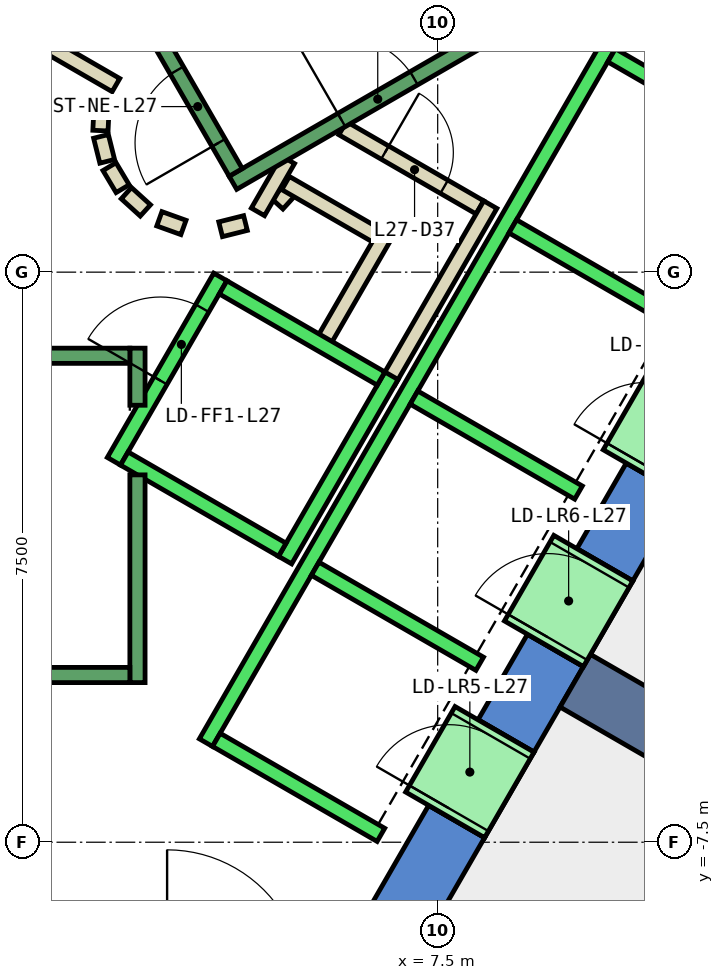
"""IFC4 building model, lengths in metres.
Left out: names, types, materials, properties, quantities, classifications, styles, units other than length and angle.
Written with IfcOpenShell. Run it as: python <this file> out.ifc"""

import sys

from ifc_helpers import new_model, si_unit, direction, frame, frame_2d, origin, place, context, subcontext, project, spatial, polyline, rectangle, outline, extrude, element, fill, save


model = new_model("IFC4")
c1 = context("Model", 3, precision=1e-05, world=origin(), true_north=direction((0.0, 1.0)))
c2 = subcontext(c1, "Body", "Model", "MODEL_VIEW")
j1 = project(units=[si_unit("LENGTHUNIT", "METRE"), si_unit("PLANEANGLEUNIT", "RADIAN")], contexts=[c1])
p1 = place(None, origin())
s1 = spatial("IfcSite", under=j1, at=p1, CompositionType="ELEMENT")
p2 = place(p1, origin())
s2 = spatial("IfcBuilding", under=s1, at=p2, CompositionType="ELEMENT")
p3 = place(p2, frame((0.0, 0.0, 124.4)))
s3 = spatial("IfcBuildingStorey", under=s2, at=p3, CompositionType="ELEMENT", Elevation=124.4)
p4 = place(p3, frame((0.0, 0.0, -0.4)))
e1 = element("IfcWall", 1, at=p4, inside=s3, PredefinedType="SHEAR", context=c2, shape_type="SweptSolid", body=[
    extrude(outline(polyline([(8.517, 11.748), (7.781, 11.323), (12.875, 2.5), (13.856, 2.5), (8.517, 11.748)])), origin(), (0.0, 0.0, 1.0), 4.2),
])
p5 = place(p3, frame((0.0, 0.0, -0.4)))
e2 = element("IfcWall", 2, at=p5, inside=s3, PredefinedType="SHEAR", context=c2, shape_type="SweptSolid", body=[
    extrude(outline(polyline([(8.117, -7.44), (7.381, -7.015), (6.437, -8.65), (6.928, -9.5), (8.117, -7.44)])), origin(), (0.0, 0.0, 1.0), 4.2),
])
p6 = place(p3, frame((0.0, 0.0, -0.4)))
e3 = element("IfcWall", 3, at=p6, inside=s3, PredefinedType="SHEAR", context=c2, shape_type="SweptSolid", body=[
    extrude(outline(polyline([(9.417, -5.189), (8.681, -4.764), (8.031, -5.889), (8.767, -6.314), (9.417, -5.189)])), origin(), (0.0, 0.0, 1.0), 4.2),
])
p7 = place(p3, frame((0.0, 0.0, -0.4)))
e4 = element("IfcWall", 4, at=p7, inside=s3, PredefinedType="SHEAR", context=c2, shape_type="SweptSolid", body=[
    extrude(outline(polyline([(10.717, -2.937), (9.981, -2.512), (9.331, -3.638), (10.067, -4.063), (10.717, -2.937)])), origin(), (0.0, 0.0, 1.0), 4.2),
])
p8 = place(p3, frame((0.0, 0.0, 3.6)))
e5 = element("IfcWall", 5, at=p8, inside=s3, PredefinedType="SHEAR", context=c2, shape_type="SweptSolid", body=[
    extrude(outline(polyline([(8.767, -6.314), (8.031, -5.889), (7.381, -7.015), (8.117, -7.44), (8.767, -6.314)])), origin(), (0.0, 0.0, 1.0), 0.2),
])
p9 = place(p3, frame((0.0, 0.0, 3.6)))
e6 = element("IfcWall", 6, at=p9, inside=s3, PredefinedType="SHEAR", context=c2, shape_type="SweptSolid", body=[
    extrude(outline(polyline([(10.067, -4.063), (9.331, -3.638), (8.681, -4.764), (9.417, -5.189), (10.067, -4.063)])), origin(), (0.0, 0.0, 1.0), 0.2),
])
p10 = place(p3, frame((0.0, 0.0, 3.6)))
e7 = element("IfcWall", 7, at=p10, inside=s3, PredefinedType="SHEAR", context=c2, shape_type="SweptSolid", body=[
    extrude(outline(polyline([(11.367, -1.811), (10.631, -1.386), (9.981, -2.512), (10.717, -2.937), (11.367, -1.811)])), origin(), (0.0, 0.0, 1.0), 0.2),
])
p11 = place(p3, frame((9.31, -5.375, -0.4), z_axis=(0.0, 0.0, 1.0), x_axis=(0.866017533419, -0.500013631625, 0.0)))
e8 = element("IfcWall", 8, at=p11, inside=s3, PredefinedType="SHEAR", context=c2, shape_type="SweptSolid", body=[
    extrude(rectangle(XDim=9.0, YDim=0.8, at=frame_2d((4.5, 0.0))), origin(), (0.0, 0.0, 1.0), 4.2),
])
p12 = place(p3, frame((5.39, 0.898, 0.0), z_axis=(0.0, 0.0, 1.0), x_axis=(0.673828488714, 0.738887791073, 0.0)))
e9 = element("IfcWall", 9, at=p12, inside=s3, PredefinedType="PARTITIONING", context=c2, shape_type="SweptSolid", body=[
    extrude(rectangle(XDim=0.263, YDim=0.2, at=frame_2d((0.131, 0.0))), origin(), (0.0, 0.0, 1.0), 3.8),
])
p13 = place(p3, frame((5.499, 1.172, 0.0), z_axis=(0.0, 0.0, 1.0), x_axis=(0.866333505267, -0.499465972466, 0.0)))
e10 = element("IfcWall", 10, at=p13, inside=s3, PredefinedType="PARTITIONING", context=c2, shape_type="SweptSolid", body=[
    extrude(rectangle(XDim=1.374, YDim=0.2, at=frame_2d((0.687, 0.0))), origin(), (0.0, 0.0, 1.0), 3.8),
])
p14 = place(p3, frame((6.826, 0.522, 0.0), z_axis=(0.0, 0.0, 1.0), x_axis=(-0.500016722714, -0.866015748706, 0.0)))
e11 = element("IfcWall", 11, at=p14, inside=s3, PredefinedType="PARTITIONING", context=c2, shape_type="SweptSolid", body=[
    extrude(rectangle(XDim=1.7, YDim=0.2, at=frame_2d((0.85, 0.0))), origin(), (0.0, 0.0, 1.0), 3.8),
])
p15 = place(p3, frame((6.25, 1.894, 0.0), z_axis=(0.0, 0.0, 1.0), x_axis=(0.866043184279, -0.499969202016, 0.0)))
e12 = element("IfcWall", 12, at=p15, inside=s3, PredefinedType="PARTITIONING", context=c2, shape_type="SweptSolid", body=[
    extrude(rectangle(XDim=2.084, YDim=0.2, at=frame_2d((1.042, 0.0))), origin(), (0.0, 0.0, 1.0), 3.8),
])
p16 = place(p15, frame((0.642, 0.0, 0.0)))
e13 = element("IfcOpeningElement", 13, at=p16, cuts=e12, PredefinedType="OPENING", context=c2, shape_type="SweptSolid", body=[
    extrude(rectangle(XDim=0.9, YDim=2.1, at=frame_2d((0.45, 1.05))), frame((0.0, 0.11, 0.0), z_axis=(0.0, -1.0, 0.0), x_axis=(1.0, 0.0, 0.0)), (0.0, 0.0, 1.0), 0.22),
])
p17 = place(p3, frame((8.192, 0.888, 0.0), z_axis=(0.0, 0.0, 1.0), x_axis=(-0.499940625693, -0.866059680843, 0.0)))
e14 = element("IfcWall", 14, at=p17, inside=s3, PredefinedType="PARTITIONING", context=c2, shape_type="SweptSolid", body=[
    extrude(rectangle(XDim=2.68, YDim=0.2, at=frame_2d((1.34, 0.0))), origin(), (0.0, 0.0, 1.0), 3.8),
])
p18 = place(p3, frame((5.135, 0.793, 0.0), z_axis=(0.0, 0.0, 1.0), x_axis=(0.499526442893, 0.866298639529, 0.0)))
e15 = element("IfcWall", 15, at=p18, inside=s3, PredefinedType="PARTITIONING", context=c2, shape_type="SweptSolid", body=[
    extrude(rectangle(XDim=0.791, YDim=0.2, at=frame_2d((0.396, 0.0))), origin(), (0.0, 0.0, 1.0), 3.8),
])
p19 = place(p3, frame((2.012, 3.186, 0.0), z_axis=(0.0, 0.0, 1.0), x_axis=(0.865891012941, -0.500232699559, 0.0)))
e16 = element("IfcWall", 16, at=p19, inside=s3, PredefinedType="PARTITIONING", context=c2, shape_type="SweptSolid", body=[
    extrude(rectangle(XDim=1.449, YDim=0.2, at=frame_2d((0.725, 0.0))), origin(), (0.0, 0.0, 1.0), 3.8),
])
p20 = place(p3, frame((3.079, 2.199, 0.0), z_axis=(0.0, 0.0, 1.0), x_axis=(-0.047771483479, -0.998858290933, 0.0)))
e17 = element("IfcWall", 17, at=p20, inside=s3, PredefinedType="PARTITIONING", context=c2, shape_type="SweptSolid", body=[
    extrude(rectangle(XDim=0.337, YDim=0.2, at=frame_2d((0.169, 0.0))), origin(), (0.0, 0.0, 1.0), 3.8),
])
p21 = place(p3, frame((3.07, 1.786, 0.0), z_axis=(0.0, 0.0, 1.0), x_axis=(0.242705583207, -0.970099994784, 0.0)))
e18 = element("IfcWall", 18, at=p21, inside=s3, PredefinedType="PARTITIONING", context=c2, shape_type="SweptSolid", body=[
    extrude(rectangle(XDim=0.338, YDim=0.2, at=frame_2d((0.169, 0.0))), origin(), (0.0, 0.0, 1.0), 3.8),
])
for number, where, z_axis, x_axis in (
    (19, (3.182, 1.388, 0.0), (0.0, 0.0, 1.0), (0.512, -0.859, 0.0)),
    (20, (3.404, 1.039, 0.0), (0.0, 0.0, 1.0), (0.74, -0.672, 0.0)),
):
    element("IfcWall", number, at=place(p3, frame(where, z_axis=z_axis, x_axis=x_axis)), inside=s3, PredefinedType="PARTITIONING", context=c2, shape_type="SweptSolid", body=[
        extrude(rectangle(XDim=0.338, YDim=0.2, at=frame_2d((0.169, 0.0))), origin(), (0.0, 0.0, 1.0), 3.8),
    ])
p22 = place(p3, frame((3.838, 0.702, 0.0), z_axis=(0.0, 0.0, 1.0), x_axis=(0.941035081519, -0.338308993895, 0.0)))
e21 = element("IfcWall", 21, at=p22, inside=s3, PredefinedType="PARTITIONING", context=c2, shape_type="SweptSolid", body=[
    extrude(rectangle(XDim=0.337, YDim=0.2, at=frame_2d((0.168, 0.0))), origin(), (0.0, 0.0, 1.0), 3.8),
])
p23 = place(p3, frame((4.644, 0.564, 0.0), z_axis=(0.0, 0.0, 1.0), x_axis=(0.969929076366, 0.243387729394, 0.0)))
e22 = element("IfcWall", 22, at=p23, inside=s3, PredefinedType="PARTITIONING", context=c2, shape_type="SweptSolid", body=[
    extrude(rectangle(XDim=0.337, YDim=0.2, at=frame_2d((0.168, 0.0))), origin(), (0.0, 0.0, 1.0), 3.8),
])
p24 = place(p3, frame((12.401, -7.621, 0.0), z_axis=(0.0, 0.0, 1.0), x_axis=(-0.499983724212, -0.866034800411, 0.0)))
e23 = element("IfcWall", 23, at=p24, inside=s3, PredefinedType="PARTITIONING", context=c2, shape_type="SweptSolid", body=[
    extrude(rectangle(XDim=9.302, YDim=0.2, at=frame_2d((4.651, 0.0))), origin(), (0.0, 0.0, 1.0), 3.8),
])
p25 = place(p24, frame((0.231, 0.0, 0.0)))
e24 = element("IfcOpeningElement", 24, at=p25, cuts=e23, PredefinedType="OPENING", context=c2, shape_type="SweptSolid", body=[
    extrude(rectangle(XDim=1.0, YDim=2.1, at=frame_2d((0.5, 1.05))), frame((0.0, 0.11, 0.0), z_axis=(0.0, -1.0, 0.0), x_axis=(1.0, 0.0, 0.0)), (0.0, 0.0, 1.0), 0.22),
])
p26 = place(p24, frame((1.331, 0.0, 0.0)))
e25 = element("IfcOpeningElement", 25, at=p26, cuts=e23, PredefinedType="OPENING", context=c2, shape_type="SweptSolid", body=[
    extrude(rectangle(XDim=1.0, YDim=2.1, at=frame_2d((0.5, 1.05))), frame((0.0, 0.11, 0.0), z_axis=(0.0, -1.0, 0.0), x_axis=(1.0, 0.0, 0.0)), (0.0, 0.0, 1.0), 0.22),
])
p27 = place(p3, frame((3.24, -2.488, 0.0), z_axis=(0.0, 0.0, 1.0), x_axis=(0.49994636267, 0.866056369097, 0.0)))
e26 = element("IfcWall", 26, at=p27, inside=s3, PredefinedType="STANDARD", context=c2, shape_type="SweptSolid", body=[
    extrude(rectangle(XDim=2.8, YDim=0.2, at=frame_2d((1.4, 0.0))), origin(), (0.0, 0.0, 1.0), 3.8),
])
p28 = place(p27, frame((1.225, 0.0, 0.0)))
e27 = element("IfcOpeningElement", 27, at=p28, cuts=e26, PredefinedType="OPENING", context=c2, shape_type="SweptSolid", body=[
    extrude(rectangle(XDim=1.1, YDim=2.1, at=frame_2d((0.55, 1.05))), frame((0.0, 0.11, 0.0), z_axis=(0.0, -1.0, 0.0), x_axis=(1.0, 0.0, 0.0)), (0.0, 0.0, 1.0), 0.22),
])
p29 = place(p3, frame((5.492, -3.788, 0.0), z_axis=(0.0, 0.0, 1.0), x_axis=(0.500011755427, 0.866018616679, 0.0)))
e28 = element("IfcWall", 28, at=p29, inside=s3, PredefinedType="STANDARD", context=c2, shape_type="SweptSolid", body=[
    extrude(rectangle(XDim=2.8, YDim=0.2, at=frame_2d((1.4, 0.0))), origin(), (0.0, 0.0, 1.0), 3.8),
])
p30 = place(p3, frame((3.377, -2.452, 0.0), z_axis=(0.0, 0.0, 1.0), x_axis=(0.865955154139, -0.50012165622, 0.0)))
e29 = element("IfcWall", 29, at=p30, inside=s3, PredefinedType="STANDARD", context=c2, shape_type="SweptSolid", body=[
    extrude(rectangle(XDim=2.4, YDim=0.2, at=frame_2d((1.2, 0.0))), origin(), (0.0, 0.0, 1.0), 3.8),
])
p31 = place(p3, frame((4.677, -0.2, 0.0), z_axis=(0.0, 0.0, 1.0), x_axis=(0.865973769406, -0.500089422704, 0.0)))
e30 = element("IfcWall", 30, at=p31, inside=s3, PredefinedType="STANDARD", context=c2, shape_type="SweptSolid", body=[
    extrude(rectangle(XDim=2.399, YDim=0.2, at=frame_2d((1.2, 0.0))), origin(), (0.0, 0.0, 1.0), 3.8),
])
p32 = place(p3, frame((4.451, -6.19, 0.0), z_axis=(0.0, 0.0, 1.0), x_axis=(0.50000090737, 0.866024879913, 0.0)))
e31 = element("IfcWall", 31, at=p32, inside=s3, PredefinedType="STANDARD", context=c2, shape_type="SweptSolid", body=[
    extrude(rectangle(XDim=10.6, YDim=0.2, at=frame_2d((5.3, 0.0))), origin(), (0.0, 0.0, 1.0), 3.8),
])
for number, where, z_axis, x_axis in (
    (32, (4.588, -6.153, 0.0), (0.0, 0.0, 1.0), (0.866, -0.5, 0.0)),
    (33, (5.888, -3.902, 0.0), (0.0, 0.0, 1.0), (0.866, -0.5, 0.0)),
    (34, (7.188, -1.65, 0.0), (0.0, 0.0, 1.0), (0.866, -0.5, 0.0)),
    (35, (8.488, 0.602, 0.0), (0.0, 0.0, 1.0), (0.866, -0.5, 0.0)),
):
    element("IfcWall", number, at=place(p3, frame(where, z_axis=z_axis, x_axis=x_axis)), inside=s3, PredefinedType="STANDARD", context=c2, shape_type="SweptSolid", body=[
        extrude(rectangle(XDim=2.5, YDim=0.2, at=frame_2d((1.25, 0.0))), origin(), (0.0, 0.0, 1.0), 3.8),
    ])
p33 = place(p3, frame((9.788, 2.853, 0.0), z_axis=(0.0, 0.0, 1.0), x_axis=(0.865998541277, -0.500046524342, 0.0)))
e36 = element("IfcWall", 36, at=p33, inside=s3, PredefinedType="STANDARD", context=c2, shape_type="SweptSolid", body=[
    extrude(rectangle(XDim=2.5, YDim=0.2, at=frame_2d((1.25, 0.0))), origin(), (0.0, 0.0, 1.0), 3.8),
])
p34 = place(p3, frame((7.598, -7.14, 0.0), z_axis=(0.0, 0.0, 1.0), x_axis=(0.500362116554, 0.865816234728, 0.0)))
e37 = element("IfcWall", 37, at=p34, inside=s3, PredefinedType="STANDARD", context=c2, shape_type="SweptSolid", body=[
    extrude(rectangle(XDim=1.299, YDim=1.2, at=frame_2d((0.65, 0.0))), origin(), (0.0, 0.0, 1.0), 2.4),
])
p35 = place(p34, frame((0.1, 0.0, 0.0)))
e38 = element("IfcOpeningElement", 38, at=p35, cuts=e37, PredefinedType="OPENING", context=c2, shape_type="SweptSolid", body=[
    extrude(rectangle(XDim=1.1, YDim=2.3, at=frame_2d((0.55, 1.15))), frame((0.0, 0.61, 0.0), z_axis=(0.0, -1.0, 0.0), x_axis=(1.0, 0.0, 0.0)), (0.0, 0.0, 1.0), 1.22),
])
p36 = place(p3, frame((8.898, -4.889, 0.0), z_axis=(0.0, 0.0, 1.0), x_axis=(0.500036693733, 0.866004217611, 0.0)))
e39 = element("IfcWall", 39, at=p36, inside=s3, PredefinedType="STANDARD", context=c2, shape_type="SweptSolid", body=[
    extrude(rectangle(XDim=1.3, YDim=1.2, at=frame_2d((0.65, 0.0))), origin(), (0.0, 0.0, 1.0), 2.4),
])
p37 = place(p36, frame((0.1, 0.0, 0.0)))
e40 = element("IfcOpeningElement", 40, at=p37, cuts=e39, PredefinedType="OPENING", context=c2, shape_type="SweptSolid", body=[
    extrude(rectangle(XDim=1.1, YDim=2.3, at=frame_2d((0.55, 1.15))), frame((0.0, 0.61, 0.0), z_axis=(0.0, -1.0, 0.0), x_axis=(1.0, 0.0, 0.0)), (0.0, 0.0, 1.0), 1.22),
])
p38 = place(p3, frame((10.198, -2.637, 0.0), z_axis=(0.0, 0.0, 1.0), x_axis=(0.49989585183, 0.866085525409, 0.0)))
e41 = element("IfcWall", 41, at=p38, inside=s3, PredefinedType="STANDARD", context=c2, shape_type="SweptSolid", body=[
    extrude(rectangle(XDim=1.3, YDim=1.2, at=frame_2d((0.65, 0.0))), origin(), (0.0, 0.0, 1.0), 2.4),
])
p39 = place(p38, frame((0.1, 0.0, 0.0)))
e42 = element("IfcOpeningElement", 42, at=p39, cuts=e41, PredefinedType="OPENING", context=c2, shape_type="SweptSolid", body=[
    extrude(rectangle(XDim=1.1, YDim=2.3, at=frame_2d((0.55, 1.15))), frame((0.0, 0.61, 0.0), z_axis=(0.0, -1.0, 0.0), x_axis=(1.0, 0.0, 0.0)), (0.0, 0.0, 1.0), 1.22),
])
p40 = place(p3, frame((3.55, -2.667, 0.0), z_axis=(0.0, 0.0, 1.0), x_axis=(0.0, -1.0, 0.0)))
e43 = element("IfcWall", 43, at=p40, inside=s3, PredefinedType="STANDARD", context=c2, shape_type="SweptSolid", body=[
    extrude(rectangle(XDim=2.733, YDim=0.2, at=frame_2d((1.366, 0.0))), origin(), (0.0, 0.0, 1.0), 3.8),
])
p41 = place(p3, frame((3.55, -1.0, 0.0), z_axis=(0.0, 0.0, 1.0), x_axis=(0.0, -1.0, 0.0)))
e44 = element("IfcWall", 44, at=p41, inside=s3, PredefinedType="STANDARD", context=c2, shape_type="SweptSolid", body=[
    extrude(rectangle(XDim=0.751, YDim=0.2, at=frame_2d((0.375, 0.0))), origin(), (0.0, 0.0, 1.0), 3.8),
])
p42 = place(p3, frame((-3.45, -1.1, 0.0), z_axis=(0.0, 0.0, 1.0), x_axis=(1.0, 0.0, 0.0)))
e45 = element("IfcWall", 45, at=p42, inside=s3, PredefinedType="STANDARD", context=c2, shape_type="SweptSolid", body=[
    extrude(rectangle(XDim=6.9, YDim=0.2, at=frame_2d((3.45, 0.0))), origin(), (0.0, 0.0, 1.0), 3.8),
])
p43 = place(p42, frame((0.45, 0.0, 0.0)))
e46 = element("IfcOpeningElement", 46, at=p43, cuts=e45, PredefinedType="OPENING", context=c2, shape_type="SweptSolid", body=[
    extrude(rectangle(XDim=1.1, YDim=2.2, at=frame_2d((0.55, 1.1))), frame((0.0, 0.11, 0.0), z_axis=(0.0, -1.0, 0.0), x_axis=(1.0, 0.0, 0.0)), (0.0, 0.0, 1.0), 0.22),
])
p44 = place(p3, frame((-3.45, -5.3, 0.0), z_axis=(0.0, 0.0, 1.0), x_axis=(1.0, 0.0, 0.0)))
e47 = element("IfcWall", 47, at=p44, inside=s3, PredefinedType="STANDARD", context=c2, shape_type="SweptSolid", body=[
    extrude(rectangle(XDim=6.9, YDim=0.2, at=frame_2d((3.45, 0.0))), origin(), (0.0, 0.0, 1.0), 3.8),
])
p45 = place(p3, frame((4.806, 1.176, 0.0), z_axis=(0.0, 0.0, 1.0), x_axis=(0.866059941101, 0.499940174841, 0.0)))
e48 = element("IfcWall", 48, at=p45, inside=s3, PredefinedType="STANDARD", context=c2, shape_type="SweptSolid", body=[
    extrude(rectangle(XDim=4.4, YDim=0.2, at=frame_2d((2.2, 0.0))), origin(), (0.0, 0.0, 1.0), 3.8),
])
p46 = place(p45, frame((1.65, 0.0, 0.0)))
e49 = element("IfcOpeningElement", 49, at=p46, cuts=e48, PredefinedType="OPENING", context=c2, shape_type="SweptSolid", body=[
    extrude(rectangle(XDim=1.1, YDim=2.2, at=frame_2d((0.55, 1.1))), frame((0.0, 0.11, 0.0), z_axis=(0.0, -1.0, 0.0), x_axis=(1.0, 0.0, 0.0)), (0.0, 0.0, 1.0), 0.22),
])
p47 = place(p3, frame((4.843, 1.312, 0.0), z_axis=(0.0, 0.0, 1.0), x_axis=(-0.499963383562, 0.866046543262, 0.0)))
e50 = element("IfcWall", 50, at=p47, inside=s3, PredefinedType="STANDARD", context=c2, shape_type="SweptSolid", body=[
    extrude(rectangle(XDim=6.9, YDim=0.2, at=frame_2d((3.45, 0.0))), origin(), (0.0, 0.0, 1.0), 3.8),
])
p48 = place(p47, frame((0.45, 0.0, 0.0)))
e51 = element("IfcOpeningElement", 51, at=p48, cuts=e50, PredefinedType="OPENING", context=c2, shape_type="SweptSolid", body=[
    extrude(rectangle(XDim=1.1, YDim=2.2, at=frame_2d((0.55, 1.1))), frame((0.0, 0.11, 0.0), z_axis=(0.0, -1.0, 0.0), x_axis=(1.0, 0.0, 0.0)), (0.0, 0.0, 1.0), 0.22),
])
p49 = place(p16, origin())
e52 = element("IfcDoor", 52, at=p49, inside=s3, OperationType="SINGLE_SWING_LEFT", PredefinedType="DOOR", context=c2, shape_type="SweptSolid", body=[
    extrude(rectangle(XDim=0.9, YDim=2.1, at=frame_2d((0.45, 1.05))), frame((0.0, 0.025, 0.0), z_axis=(0.0, -1.0, 0.0), x_axis=(1.0, 0.0, 0.0)), (0.0, 0.0, 1.0), 0.05),
])
fill(e13, e52)
p50 = place(p35, origin())
e53 = element("IfcDoor", 53, at=p50, inside=s3, OperationType="SLIDING_TO_LEFT", PredefinedType="DOOR", context=c2, shape_type="SweptSolid", body=[
    extrude(rectangle(XDim=1.1, YDim=2.3, at=frame_2d((0.55, 1.15))), frame((0.0, 0.025, 0.0), z_axis=(0.0, -1.0, 0.0), x_axis=(1.0, 0.0, 0.0)), (0.0, 0.0, 1.0), 0.05),
])
fill(e38, e53)
p51 = place(p37, origin())
e54 = element("IfcDoor", 54, at=p51, inside=s3, OperationType="SLIDING_TO_LEFT", PredefinedType="DOOR", context=c2, shape_type="SweptSolid", body=[
    extrude(rectangle(XDim=1.1, YDim=2.3, at=frame_2d((0.55, 1.15))), frame((0.0, 0.025, 0.0), z_axis=(0.0, -1.0, 0.0), x_axis=(1.0, 0.0, 0.0)), (0.0, 0.0, 1.0), 0.05),
])
fill(e40, e54)
p52 = place(p28, origin())
e55 = element("IfcDoor", 55, at=p52, inside=s3, OperationType="SLIDING_TO_LEFT", PredefinedType="DOOR", context=c2, shape_type="SweptSolid", body=[
    extrude(rectangle(XDim=1.1, YDim=2.1, at=frame_2d((0.55, 1.05))), frame((0.0, 0.025, 0.0), z_axis=(0.0, -1.0, 0.0), x_axis=(1.0, 0.0, 0.0)), (0.0, 0.0, 1.0), 0.05),
])
fill(e27, e55)
p53 = place(p48, origin())
e56 = element("IfcDoor", 56, at=p53, inside=s3, OperationType="SINGLE_SWING_LEFT", PredefinedType="DOOR", context=c2, shape_type="SweptSolid", body=[
    extrude(rectangle(XDim=1.1, YDim=2.2, at=frame_2d((0.55, 1.1))), frame((0.0, 0.025, 0.0), z_axis=(0.0, -1.0, 0.0), x_axis=(1.0, 0.0, 0.0)), (0.0, 0.0, 1.0), 0.05),
])
fill(e51, e56)
p54 = place(p46, origin())
e57 = element("IfcDoor", 57, at=p54, inside=s3, OperationType="SINGLE_SWING_LEFT", PredefinedType="DOOR", context=c2, shape_type="SweptSolid", body=[
    extrude(rectangle(XDim=1.1, YDim=2.2, at=frame_2d((0.55, 1.1))), frame((0.0, 0.025, 0.0), z_axis=(0.0, -1.0, 0.0), x_axis=(1.0, 0.0, 0.0)), (0.0, 0.0, 1.0), 0.05),
])
fill(e49, e57)
save(model, sys.argv[1])
